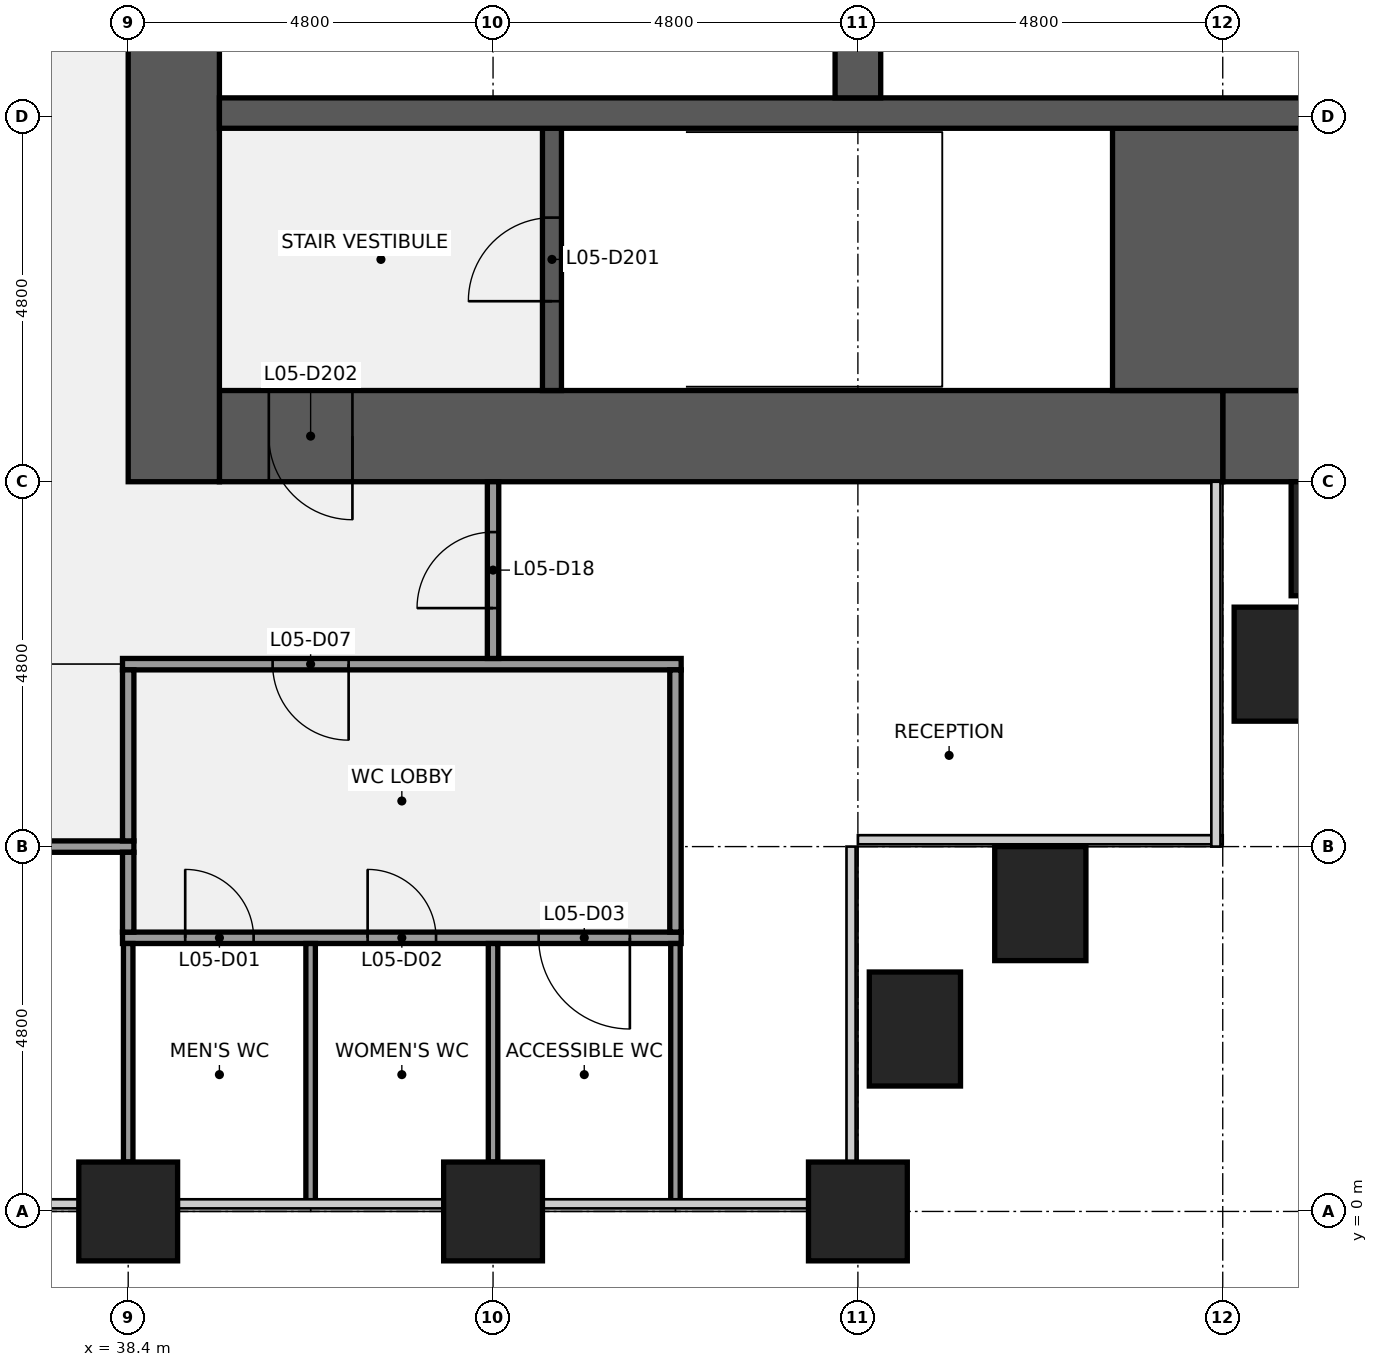
"""IFC4 building model, lengths in metres.
Left out: names, types, materials, properties, quantities, classifications, styles, units other than length and angle.
Written with IfcOpenShell. Run it as: python <this file> out.ifc"""

import sys

from ifc_helpers import new_model, si_unit, direction, frame, frame_2d, origin, origin_2d, place, context, subcontext, project, spatial, rectangle, extrude, element, fill, save


model = new_model("IFC4")
c1 = context("Model", 3, precision=1e-05, world=origin(), true_north=direction((0.0, 1.0)))
c2 = subcontext(c1, "Body", "Model", "MODEL_VIEW")
j1 = project(units=[si_unit("LENGTHUNIT", "METRE"), si_unit("PLANEANGLEUNIT", "RADIAN")], contexts=[c1])
p1 = place(None, origin())
s1 = spatial("IfcSite", under=j1, at=p1, CompositionType="ELEMENT")
p2 = place(p1, origin())
s2 = spatial("IfcBuilding", under=s1, at=p2, CompositionType="ELEMENT")
p3 = place(p2, frame((0.0, 0.0, 30.2)))
s3 = spatial("IfcBuildingStorey", under=s2, at=p3, CompositionType="ELEMENT", Elevation=30.2)
for number, where, z_axis, x_axis in (
    (1, (38.4, 0.0, 0.0), (0.0, 0.0, 1.0), (1.0, 0.0, 0.0)),
    (2, (43.2, 0.0, 0.0), (0.0, 0.0, 1.0), (1.0, 0.0, 0.0)),
    (3, (48.0, 0.0, 0.0), (0.0, 0.0, 1.0), (1.0, 0.0, 0.0)),
):
    element("IfcColumn", number, at=place(p3, frame(where, z_axis=z_axis, x_axis=x_axis)), inside=s3, PredefinedType="COLUMN", context=c2, shape_type="SweptSolid", body=[
        extrude(rectangle(XDim=1.3, YDim=1.3, at=origin_2d()), origin(), (0.0, 0.0, 1.0), 4.4),
    ])
p4 = place(p3, frame((56.4, 10.2, 0.0), z_axis=(0.0, 0.0, 1.0), x_axis=(-1.0, 0.0, 0.0)))
e4 = element("IfcWall", 4, at=p4, inside=s3, PredefinedType="SHEAR", context=c2, shape_type="SweptSolid", body=[
    extrude(rectangle(XDim=3.6, YDim=1.2, at=frame_2d((1.8, 0.0))), origin(), (0.0, 0.0, 1.0), 4.24),
])
p5 = place(p3, frame((52.8, 10.2, 0.0), z_axis=(0.0, 0.0, 1.0), x_axis=(-1.0, 0.0, 0.0)))
e5 = element("IfcWall", 5, at=p5, inside=s3, PredefinedType="SHEAR", context=c2, shape_type="SweptSolid", body=[
    extrude(rectangle(XDim=13.2, YDim=1.2, at=frame_2d((6.6, 0.0))), origin(), (0.0, 0.0, 1.0), 4.24),
])
p6 = place(p5, frame((11.45, 0.0, 0.0)))
e6 = element("IfcOpeningElement", 6, at=p6, cuts=e5, PredefinedType="OPENING", context=c2, shape_type="SweptSolid", body=[
    extrude(rectangle(XDim=1.1, YDim=2.1, at=frame_2d((0.55, 1.05))), frame((0.0, 0.61, 0.0), z_axis=(0.0, -1.0, 0.0), x_axis=(1.0, 0.0, 0.0)), (0.0, 0.0, 1.0), 1.22),
])
p7 = place(p3, frame((39.0, 9.6, 0.0), z_axis=(0.0, 0.0, 1.0), x_axis=(0.0, 1.0, 0.0)))
e7 = element("IfcWall", 7, at=p7, inside=s3, PredefinedType="SHEAR", context=c2, shape_type="SweptSolid", body=[
    extrude(rectangle(XDim=28.8, YDim=1.2, at=frame_2d((14.4, 0.0))), origin(), (0.0, 0.0, 1.0), 4.24),
])
p8 = place(p7, frame((8.7, 0.0, 0.0)))
e8 = element("IfcOpeningElement", 8, at=p8, cuts=e7, PredefinedType="OPENING", context=c2, shape_type="SweptSolid", body=[
    extrude(rectangle(XDim=1.8, YDim=2.1, at=frame_2d((0.9, 1.05))), frame((0.0, 0.61, 0.0), z_axis=(0.0, -1.0, 0.0), x_axis=(1.0, 0.0, 0.0)), (0.0, 0.0, 1.0), 1.22),
])
p9 = place(p7, frame((18.3, 0.0, 0.0)))
e9 = element("IfcOpeningElement", 9, at=p9, cuts=e7, PredefinedType="OPENING", context=c2, shape_type="SweptSolid", body=[
    extrude(rectangle(XDim=1.8, YDim=2.1, at=frame_2d((0.9, 1.05))), frame((0.0, 0.61, 0.0), z_axis=(0.0, -1.0, 0.0), x_axis=(1.0, 0.0, 0.0)), (0.0, 0.0, 1.0), 1.22),
])
p10 = place(p3, frame((51.35, 12.525, 0.0), z_axis=(0.0, 0.0, 1.0), x_axis=(1.0, 0.0, 0.0)))
e10 = element("IfcWall", 10, at=p10, inside=s3, PredefinedType="SHEAR", context=c2, shape_type="SweptSolid", body=[
    extrude(rectangle(XDim=5.05, YDim=3.45, at=frame_2d((2.525, 0.0))), origin(), (0.0, 0.0, 1.0), 4.24),
])
p11 = place(p3, frame((43.975, 10.8, 0.0), z_axis=(0.0, 0.0, 1.0), x_axis=(0.0, 1.0, 0.0)))
e11 = element("IfcWall", 11, at=p11, inside=s3, PredefinedType="SHEAR", context=c2, shape_type="SweptSolid", body=[
    extrude(rectangle(XDim=3.45, YDim=0.25, at=frame_2d((1.725, 0.0))), origin(), (0.0, 0.0, 1.0), 4.24),
])
p12 = place(p11, frame((1.175, 0.0, 0.0)))
e12 = element("IfcOpeningElement", 12, at=p12, cuts=e11, PredefinedType="OPENING", context=c2, shape_type="SweptSolid", body=[
    extrude(rectangle(XDim=1.1, YDim=2.1, at=frame_2d((0.55, 1.05))), frame((0.0, 0.135, 0.0), z_axis=(0.0, -1.0, 0.0), x_axis=(1.0, 0.0, 0.0)), (0.0, 0.0, 1.0), 0.27),
])
p13 = place(p3, frame((39.6, 14.45, 0.0), z_axis=(0.0, 0.0, 1.0), x_axis=(1.0, 0.0, 0.0)))
e13 = element("IfcWall", 13, at=p13, inside=s3, PredefinedType="SHEAR", context=c2, shape_type="SweptSolid", body=[
    extrude(rectangle(XDim=16.8, YDim=0.4, at=frame_2d((8.4, 0.0))), origin(), (0.0, 0.0, 1.0), 4.24),
])
p14 = place(p3, frame((48.0, 14.65, 0.0), z_axis=(0.0, 0.0, 1.0), x_axis=(0.0, 1.0, 0.0)))
e14 = element("IfcWall", 14, at=p14, inside=s3, PredefinedType="SHEAR", context=c2, shape_type="SweptSolid", body=[
    extrude(rectangle(XDim=2.6, YDim=0.6, at=frame_2d((1.3, 0.0))), origin(), (0.0, 0.0, 1.0), 4.24),
])
p15 = place(p3, frame((38.325, 3.6, 0.0), z_axis=(0.0, 0.0, 1.0), x_axis=(1.0, 0.0, 0.0)))
e15 = element("IfcWall", 15, at=p15, inside=s3, PredefinedType="PARTITIONING", context=c2, shape_type="SweptSolid", body=[
    extrude(rectangle(XDim=7.35, YDim=0.15, at=frame_2d((3.675, 0.0))), origin(), (0.0, 0.0, 1.0), 3.25),
])
p16 = place(p15, frame((0.825, 0.0, 0.0)))
e16 = element("IfcOpeningElement", 16, at=p16, cuts=e15, PredefinedType="OPENING", context=c2, shape_type="SweptSolid", body=[
    extrude(rectangle(XDim=0.9, YDim=2.1, at=frame_2d((0.45, 1.05))), frame((0.0, 0.085, 0.0), z_axis=(0.0, -1.0, 0.0), x_axis=(1.0, 0.0, 0.0)), (0.0, 0.0, 1.0), 0.17),
])
p17 = place(p15, frame((3.225, 0.0, 0.0)))
e17 = element("IfcOpeningElement", 17, at=p17, cuts=e15, PredefinedType="OPENING", context=c2, shape_type="SweptSolid", body=[
    extrude(rectangle(XDim=0.9, YDim=2.1, at=frame_2d((0.45, 1.05))), frame((0.0, 0.085, 0.0), z_axis=(0.0, -1.0, 0.0), x_axis=(1.0, 0.0, 0.0)), (0.0, 0.0, 1.0), 0.17),
])
p18 = place(p15, frame((5.475, 0.0, 0.0)))
e18 = element("IfcOpeningElement", 18, at=p18, cuts=e15, PredefinedType="OPENING", context=c2, shape_type="SweptSolid", body=[
    extrude(rectangle(XDim=1.2, YDim=2.1, at=frame_2d((0.6, 1.05))), frame((0.0, 0.085, 0.0), z_axis=(0.0, -1.0, 0.0), x_axis=(1.0, 0.0, 0.0)), (0.0, 0.0, 1.0), 0.17),
])
p19 = place(p3, frame((19.125, 4.8, 0.0), z_axis=(0.0, 0.0, 1.0), x_axis=(1.0, 0.0, 0.0)))
e19 = element("IfcWall", 19, at=p19, inside=s3, PredefinedType="PARTITIONING", context=c2, shape_type="SweptSolid", body=[
    extrude(rectangle(XDim=19.35, YDim=0.15, at=frame_2d((9.675, 0.0))), origin(), (0.0, 0.0, 1.0), 3.25),
])
p20 = place(p19, frame((9.175, 0.0, 0.0)))
e20 = element("IfcOpeningElement", 20, at=p20, cuts=e19, PredefinedType="OPENING", context=c2, shape_type="SweptSolid", body=[
    extrude(rectangle(XDim=1.0, YDim=2.1, at=frame_2d((0.5, 1.05))), frame((0.0, 0.085, 0.0), z_axis=(0.0, -1.0, 0.0), x_axis=(1.0, 0.0, 0.0)), (0.0, 0.0, 1.0), 0.17),
])
p21 = place(p3, frame((38.325, 7.2, 0.0), z_axis=(0.0, 0.0, 1.0), x_axis=(1.0, 0.0, 0.0)))
e21 = element("IfcWall", 21, at=p21, inside=s3, PredefinedType="PARTITIONING", context=c2, shape_type="SweptSolid", body=[
    extrude(rectangle(XDim=7.35, YDim=0.15, at=frame_2d((3.675, 0.0))), origin(), (0.0, 0.0, 1.0), 3.25),
])
p22 = place(p21, frame((1.975, 0.0, 0.0)))
e22 = element("IfcOpeningElement", 22, at=p22, cuts=e21, PredefinedType="OPENING", context=c2, shape_type="SweptSolid", body=[
    extrude(rectangle(XDim=1.0, YDim=2.1, at=frame_2d((0.5, 1.05))), frame((0.0, 0.085, 0.0), z_axis=(0.0, -1.0, 0.0), x_axis=(1.0, 0.0, 0.0)), (0.0, 0.0, 1.0), 0.17),
])
p23 = place(p3, frame((38.4, 0.65, 0.0), z_axis=(0.0, 0.0, 1.0), x_axis=(0.0, 1.0, 0.0)))
e23 = element("IfcWall", 23, at=p23, inside=s3, PredefinedType="PARTITIONING", context=c2, shape_type="SweptSolid", body=[
    extrude(rectangle(XDim=2.875, YDim=0.125, at=frame_2d((1.438, 0.0))), origin(), (0.0, 0.0, 1.0), 3.25),
])
p24 = place(p3, frame((38.4, 3.675, 0.0), z_axis=(0.0, 0.0, 1.0), x_axis=(0.0, 1.0, 0.0)))
e24 = element("IfcWall", 24, at=p24, inside=s3, PredefinedType="PARTITIONING", context=c2, shape_type="SweptSolid", body=[
    extrude(rectangle(XDim=1.05, YDim=0.15, at=frame_2d((0.525, 0.0))), origin(), (0.0, 0.0, 1.0), 3.25),
])
p25 = place(p3, frame((38.4, 4.875, 0.0), z_axis=(0.0, 0.0, 1.0), x_axis=(0.0, 1.0, 0.0)))
e25 = element("IfcWall", 25, at=p25, inside=s3, PredefinedType="PARTITIONING", context=c2, shape_type="SweptSolid", body=[
    extrude(rectangle(XDim=2.25, YDim=0.15, at=frame_2d((1.125, 0.0))), origin(), (0.0, 0.0, 1.0), 3.25),
])
p26 = place(p3, frame((40.8, 0.1, 0.0), z_axis=(0.0, 0.0, 1.0), x_axis=(0.0, 1.0, 0.0)))
e26 = element("IfcWall", 26, at=p26, inside=s3, PredefinedType="PARTITIONING", context=c2, shape_type="SweptSolid", body=[
    extrude(rectangle(XDim=3.425, YDim=0.125, at=frame_2d((1.712, 0.0))), origin(), (0.0, 0.0, 1.0), 3.25),
])
p27 = place(p3, frame((43.2, 0.65, 0.0), z_axis=(0.0, 0.0, 1.0), x_axis=(0.0, 1.0, 0.0)))
e27 = element("IfcWall", 27, at=p27, inside=s3, PredefinedType="PARTITIONING", context=c2, shape_type="SweptSolid", body=[
    extrude(rectangle(XDim=2.875, YDim=0.125, at=frame_2d((1.438, 0.0))), origin(), (0.0, 0.0, 1.0), 3.25),
])
p28 = place(p3, frame((43.2, 7.275, 0.0), z_axis=(0.0, 0.0, 1.0), x_axis=(0.0, 1.0, 0.0)))
e28 = element("IfcWall", 28, at=p28, inside=s3, PredefinedType="PARTITIONING", context=c2, shape_type="SweptSolid", body=[
    extrude(rectangle(XDim=2.325, YDim=0.15, at=frame_2d((1.163, 0.0))), origin(), (0.0, 0.0, 1.0), 3.25),
])
p29 = place(p28, frame((0.663, 0.0, 0.0)))
e29 = element("IfcOpeningElement", 29, at=p29, cuts=e28, PredefinedType="OPENING", context=c2, shape_type="SweptSolid", body=[
    extrude(rectangle(XDim=1.0, YDim=2.1, at=frame_2d((0.5, 1.05))), frame((0.0, 0.085, 0.0), z_axis=(0.0, -1.0, 0.0), x_axis=(1.0, 0.0, 0.0)), (0.0, 0.0, 1.0), 0.17),
])
p30 = place(p3, frame((45.6, 0.1, 0.0), z_axis=(0.0, 0.0, 1.0), x_axis=(0.0, 1.0, 0.0)))
e30 = element("IfcWall", 30, at=p30, inside=s3, PredefinedType="PARTITIONING", context=c2, shape_type="SweptSolid", body=[
    extrude(rectangle(XDim=3.425, YDim=0.125, at=frame_2d((1.712, 0.0))), origin(), (0.0, 0.0, 1.0), 3.25),
])
p31 = place(p3, frame((45.6, 3.675, 0.0), z_axis=(0.0, 0.0, 1.0), x_axis=(0.0, 1.0, 0.0)))
e31 = element("IfcWall", 31, at=p31, inside=s3, PredefinedType="PARTITIONING", context=c2, shape_type="SweptSolid", body=[
    extrude(rectangle(XDim=3.45, YDim=0.15, at=frame_2d((1.725, 0.0))), origin(), (0.0, 0.0, 1.0), 3.25),
])
for number, where, z_axis, x_axis in (
    (32, (48.75, 2.4, 0.0), (0.0, 0.0, 1.0), (0.0, 1.0, 0.0)),
    (33, (50.4, 4.05, 0.0), (0.0, 0.0, 1.0), (1.0, 0.0, 0.0)),
    (34, (53.55, 7.2, 0.0), (0.0, 0.0, 1.0), (0.0, 1.0, 0.0)),
):
    element("IfcColumn", number, at=place(p3, frame(where, z_axis=z_axis, x_axis=x_axis)), inside=s3, PredefinedType="PILASTER", context=c2, shape_type="SweptSolid", body=[
        extrude(rectangle(XDim=1.2, YDim=1.5, at=origin_2d()), origin(), (0.0, 0.0, 1.0), 4.1),
    ])
p32 = place(p3, frame((55.2, 8.85, 0.0), z_axis=(0.0, 0.0, 1.0), x_axis=(1.0, 0.0, 0.0)))
e35 = element("IfcColumn", 35, at=p32, inside=s3, PredefinedType="PILASTER", context=c2, shape_type="SweptSolid", body=[
    extrude(rectangle(XDim=3.0, YDim=1.5, at=origin_2d()), origin(), (0.0, 0.0, 1.0), 4.4),
])
for number, where, z_axis, x_axis in (
    (36, (38.4, -1.075, 0.0), (0.0, 0.0, 1.0), (1.0, 0.0, 0.0)),
    (37, (43.2, -1.075, 0.0), (0.0, 0.0, 1.0), (1.0, 0.0, 0.0)),
    (38, (48.0, -1.075, 0.0), (0.0, 0.0, 1.0), (1.0, 0.0, 0.0)),
):
    element("IfcColumn", number, at=place(p3, frame(where, z_axis=z_axis, x_axis=x_axis)), inside=s3, PredefinedType="PILASTER", context=c2, shape_type="SweptSolid", body=[
        extrude(rectangle(XDim=4.2, YDim=0.85, at=origin_2d()), origin(), (0.0, 0.0, 1.0), 4.4),
    ])
p33 = place(p12, origin())
e39 = element("IfcDoor", 39, at=p33, inside=s3, OperationType="SINGLE_SWING_LEFT", PredefinedType="DOOR", context=c2, shape_type="SweptSolid", body=[
    extrude(rectangle(XDim=1.1, YDim=2.1, at=frame_2d((0.55, 1.05))), frame((0.0, 0.025, 0.0), z_axis=(0.0, -1.0, 0.0), x_axis=(1.0, 0.0, 0.0)), (0.0, 0.0, 1.0), 0.05),
])
fill(e12, e39)
p34 = place(p6, origin())
e40 = element("IfcDoor", 40, at=p34, inside=s3, OperationType="SINGLE_SWING_LEFT", PredefinedType="DOOR", context=c2, shape_type="SweptSolid", body=[
    extrude(rectangle(XDim=1.1, YDim=2.1, at=frame_2d((0.55, 1.05))), frame((0.0, 0.025, 0.0), z_axis=(0.0, -1.0, 0.0), x_axis=(1.0, 0.0, 0.0)), (0.0, 0.0, 1.0), 0.05),
])
fill(e6, e40)
p35 = place(p16, origin())
e41 = element("IfcDoor", 41, at=p35, inside=s3, OperationType="SINGLE_SWING_LEFT", PredefinedType="DOOR", context=c2, shape_type="SweptSolid", body=[
    extrude(rectangle(XDim=0.9, YDim=2.1, at=frame_2d((0.45, 1.05))), frame((0.0, 0.025, 0.0), z_axis=(0.0, -1.0, 0.0), x_axis=(1.0, 0.0, 0.0)), (0.0, 0.0, 1.0), 0.05),
])
fill(e16, e41)
p36 = place(p17, origin())
e42 = element("IfcDoor", 42, at=p36, inside=s3, OperationType="SINGLE_SWING_LEFT", PredefinedType="DOOR", context=c2, shape_type="SweptSolid", body=[
    extrude(rectangle(XDim=0.9, YDim=2.1, at=frame_2d((0.45, 1.05))), frame((0.0, 0.025, 0.0), z_axis=(0.0, -1.0, 0.0), x_axis=(1.0, 0.0, 0.0)), (0.0, 0.0, 1.0), 0.05),
])
fill(e17, e42)
p37 = place(p18, origin())
e43 = element("IfcDoor", 43, at=p37, inside=s3, OperationType="SINGLE_SWING_RIGHT", PredefinedType="DOOR", context=c2, shape_type="SweptSolid", body=[
    extrude(rectangle(XDim=1.2, YDim=2.1, at=frame_2d((0.6, 1.05))), frame((0.0, 0.025, 0.0), z_axis=(0.0, -1.0, 0.0), x_axis=(1.0, 0.0, 0.0)), (0.0, 0.0, 1.0), 0.05),
])
fill(e18, e43)
p38 = place(p22, origin())
e44 = element("IfcDoor", 44, at=p38, inside=s3, OperationType="SINGLE_SWING_RIGHT", PredefinedType="DOOR", context=c2, shape_type="SweptSolid", body=[
    extrude(rectangle(XDim=1.0, YDim=2.1, at=frame_2d((0.5, 1.05))), frame((0.0, 0.025, 0.0), z_axis=(0.0, -1.0, 0.0), x_axis=(1.0, 0.0, 0.0)), (0.0, 0.0, 1.0), 0.05),
])
fill(e22, e44)
p39 = place(p29, origin())
e45 = element("IfcDoor", 45, at=p39, inside=s3, OperationType="SINGLE_SWING_LEFT", PredefinedType="DOOR", context=c2, shape_type="SweptSolid", body=[
    extrude(rectangle(XDim=1.0, YDim=2.1, at=frame_2d((0.5, 1.05))), frame((0.0, 0.025, 0.0), z_axis=(0.0, -1.0, 0.0), x_axis=(1.0, 0.0, 0.0)), (0.0, 0.0, 1.0), 0.05),
])
fill(e29, e45)
save(model, sys.argv[1])
